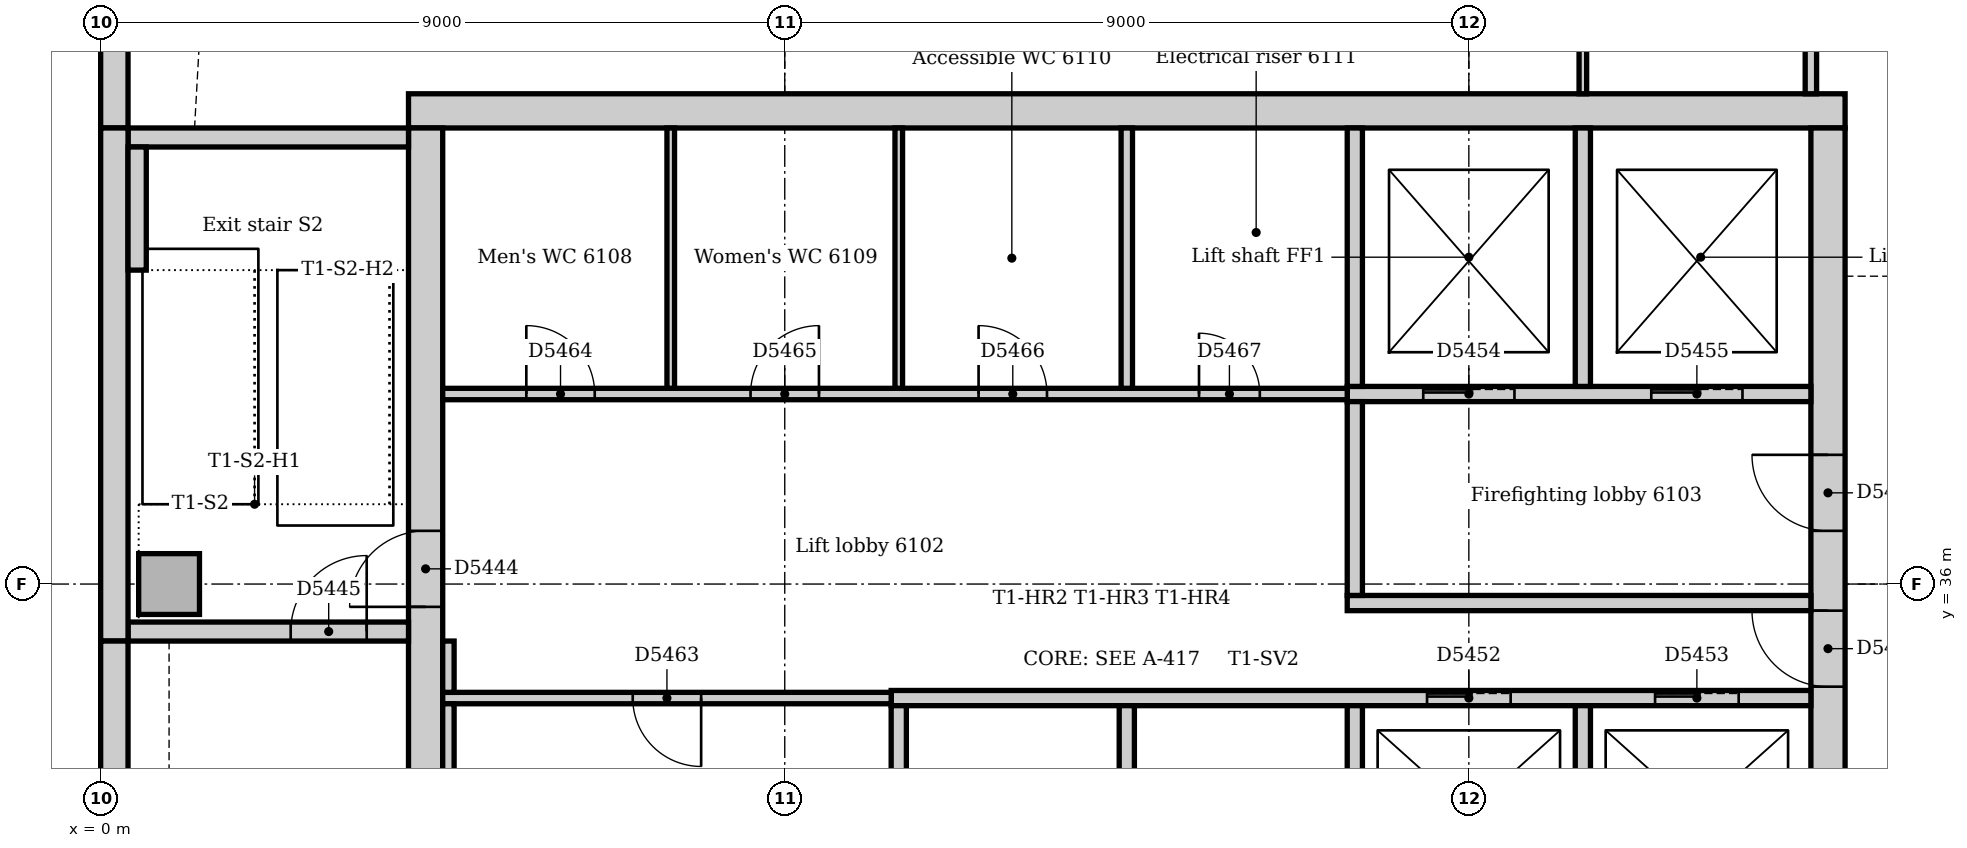
"""IFC4 building model, lengths in metres.
Left out: names, types, materials, properties, quantities, classifications, styles, units other than length and angle.
Written with IfcOpenShell. Run it as: python <this file> out.ifc"""

import sys

from ifc_helpers import new_model, si_unit, direction, frame, frame_2d, origin, origin_2d, place, context, subcontext, project, spatial, rectangle, extrude, element, fill, save


model = new_model("IFC4")
c1 = context("Model", 3, precision=1e-05, world=origin(), true_north=direction((0.0, 1.0)))
c2 = subcontext(c1, "Body", "Model", "MODEL_VIEW")
j1 = project(units=[si_unit("LENGTHUNIT", "METRE"), si_unit("PLANEANGLEUNIT", "RADIAN")], contexts=[c1])
p1 = place(None, origin())
s1 = spatial("IfcSite", under=j1, at=p1, CompositionType="ELEMENT")
p2 = place(p1, origin())
s2 = spatial("IfcBuilding", under=s1, at=p2, CompositionType="ELEMENT")
p3 = place(p2, frame((0.0, 0.0, 255.0)))
s3 = spatial("IfcBuildingStorey", under=s2, at=p3, CompositionType="ELEMENT", Elevation=255.0)
p4 = place(p3, frame((22.95, 42.225, 0.0), z_axis=(0.0, 0.0, 1.0), x_axis=(-1.0, 0.0, 0.0)))
e1 = element("IfcWall", 1, at=p4, inside=s3, PredefinedType="SOLIDWALL", context=c2, shape_type="SweptSolid", body=[
    extrude(rectangle(XDim=18.9, YDim=0.45, at=frame_2d((9.45, 0.0))), origin(), (0.0, 0.0, 1.0), 4.0),
])
p5 = place(p3, frame((22.725, 31.5, 0.0), z_axis=(0.0, 0.0, 1.0), x_axis=(0.0, 1.0, 0.0)))
e2 = element("IfcWall", 2, at=p5, inside=s3, PredefinedType="SOLIDWALL", context=c2, shape_type="SweptSolid", body=[
    extrude(rectangle(XDim=10.5, YDim=0.45, at=frame_2d((5.25, 0.0))), origin(), (0.0, 0.0, 1.0), 4.0),
])
p6 = place(p5, frame((3.15, 0.0, 0.0)))
e3 = element("IfcOpeningElement", 3, at=p6, cuts=e2, PredefinedType="OPENING", context=c2, shape_type="SweptSolid", body=[
    extrude(rectangle(XDim=1.0, YDim=2.1, at=frame_2d((0.5, 1.05))), frame((0.0, 0.235, 0.0), z_axis=(0.0, -1.0, 0.0), x_axis=(1.0, 0.0, 0.0)), (0.0, 0.0, 1.0), 0.47),
])
p7 = place(p5, frame((5.2, 0.0, 0.0)))
e4 = element("IfcOpeningElement", 4, at=p7, cuts=e2, PredefinedType="OPENING", context=c2, shape_type="SweptSolid", body=[
    extrude(rectangle(XDim=1.0, YDim=2.1, at=frame_2d((0.5, 1.05))), frame((0.0, 0.235, 0.0), z_axis=(0.0, -1.0, 0.0), x_axis=(1.0, 0.0, 0.0)), (0.0, 0.0, 1.0), 0.47),
])
p8 = place(p3, frame((4.275, 42.0, 0.0), z_axis=(0.0, 0.0, 1.0), x_axis=(0.0, -1.0, 0.0)))
e5 = element("IfcWall", 5, at=p8, inside=s3, PredefinedType="SOLIDWALL", context=c2, shape_type="SweptSolid", body=[
    extrude(rectangle(XDim=10.5, YDim=0.45, at=frame_2d((5.25, 0.0))), origin(), (0.0, 0.0, 1.0), 4.0),
])
p9 = place(p8, frame((5.3, 0.0, 0.0)))
e6 = element("IfcOpeningElement", 6, at=p9, cuts=e5, PredefinedType="OPENING", context=c2, shape_type="SweptSolid", body=[
    extrude(rectangle(XDim=1.0, YDim=2.1, at=frame_2d((0.5, 1.05))), frame((0.0, 0.235, 0.0), z_axis=(0.0, -1.0, 0.0), x_axis=(1.0, 0.0, 0.0)), (0.0, 0.0, 1.0), 0.47),
])
p10 = place(p3, frame((0.36, 35.375, 0.0), z_axis=(0.0, 0.0, 1.0), x_axis=(1.0, 0.0, 0.0)))
e7 = element("IfcWall", 7, at=p10, inside=s3, PredefinedType="SOLIDWALL", context=c2, shape_type="SweptSolid", body=[
    extrude(rectangle(XDim=3.69, YDim=0.25, at=frame_2d((1.845, 0.0))), origin(), (0.0, 0.0, 1.0), 4.0),
])
p11 = place(p10, frame((2.14, 0.0, 0.0)))
e8 = element("IfcOpeningElement", 8, at=p11, cuts=e7, PredefinedType="OPENING", context=c2, shape_type="SweptSolid", body=[
    extrude(rectangle(XDim=1.0, YDim=2.1, at=frame_2d((0.5, 1.05))), frame((0.0, 0.135, 0.0), z_axis=(0.0, -1.0, 0.0), x_axis=(1.0, 0.0, 0.0)), (0.0, 0.0, 1.0), 0.27),
])
p12 = place(p3, frame((4.05, 41.875, 0.0), z_axis=(0.0, 0.0, 1.0), x_axis=(-1.0, 0.0, 0.0)))
e9 = element("IfcWall", 9, at=p12, inside=s3, PredefinedType="SOLIDWALL", context=c2, shape_type="SweptSolid", body=[
    extrude(rectangle(XDim=3.69, YDim=0.25, at=frame_2d((1.845, 0.0))), origin(), (0.0, 0.0, 1.0), 4.0),
])
p13 = place(p3, frame((0.9, 36.0, 0.0), z_axis=(0.0, 0.0, 1.0), x_axis=(1.0, 0.0, 0.0)))
e10 = element("IfcColumn", 10, at=p13, inside=s3, PredefinedType="COLUMN", context=c2, shape_type="SweptSolid", body=[
    extrude(rectangle(XDim=0.8, YDim=0.8, at=origin_2d()), origin(), (0.0, 0.0, 1.0), 4.0),
])
p14 = place(p3, frame((0.18, 58.757, 0.0), z_axis=(0.0, 0.0, 1.0), x_axis=(0.0, -1.0, 0.0)))
e11 = element("IfcWall", 11, at=p14, inside=s3, PredefinedType="STANDARD", context=c2, shape_type="SweptSolid", body=[
    extrude(rectangle(XDim=16.757, YDim=0.36, at=frame_2d((8.379, 0.0))), origin(), (0.0, 0.0, 1.0), 3.85),
])
p15 = place(p14, frame((3.107, 0.0, 0.9)))
e12 = element("IfcOpeningElement", 12, at=p15, cuts=e11, PredefinedType="OPENING", context=c2, shape_type="SweptSolid", body=[
    extrude(rectangle(XDim=3.3, YDim=1.6, at=frame_2d((1.65, 0.8))), frame((0.0, 0.19, 0.0), z_axis=(0.0, -1.0, 0.0), x_axis=(1.0, 0.0, 0.0)), (0.0, 0.0, 1.0), 0.38),
])
p16 = place(p14, frame((7.607, 0.0, 0.9)))
e13 = element("IfcOpeningElement", 13, at=p16, cuts=e11, PredefinedType="OPENING", context=c2, shape_type="SweptSolid", body=[
    extrude(rectangle(XDim=3.3, YDim=1.6, at=frame_2d((1.65, 0.8))), frame((0.0, 0.19, 0.0), z_axis=(0.0, -1.0, 0.0), x_axis=(1.0, 0.0, 0.0)), (0.0, 0.0, 1.0), 0.38),
])
p17 = place(p14, frame((12.107, 0.0, 0.9)))
e14 = element("IfcOpeningElement", 14, at=p17, cuts=e11, PredefinedType="OPENING", context=c2, shape_type="SweptSolid", body=[
    extrude(rectangle(XDim=3.3, YDim=1.6, at=frame_2d((1.65, 0.8))), frame((0.0, 0.19, 0.0), z_axis=(0.0, -1.0, 0.0), x_axis=(1.0, 0.0, 0.0)), (0.0, 0.0, 1.0), 0.38),
])
p18 = place(p3, frame((0.18, 42.0, 0.0), z_axis=(0.0, 0.0, 1.0), x_axis=(0.0, -1.0, 0.0)))
e15 = element("IfcWall", 15, at=p18, inside=s3, PredefinedType="STANDARD", context=c2, shape_type="SweptSolid", body=[
    extrude(rectangle(XDim=6.75, YDim=0.36, at=frame_2d((3.375, 0.0))), origin(), (0.0, 0.0, 1.0), 3.85),
])
p19 = place(p3, frame((0.18, 35.25, 0.0), z_axis=(0.0, 0.0, 1.0), x_axis=(0.0, -1.0, 0.0)))
e16 = element("IfcWall", 16, at=p19, inside=s3, PredefinedType="STANDARD", context=c2, shape_type="SweptSolid", body=[
    extrude(rectangle(XDim=7.5, YDim=0.36, at=frame_2d((3.75, 0.0))), origin(), (0.0, 0.0, 1.0), 3.85),
])
p20 = place(p3, frame((0.48, 40.13, 0.0), z_axis=(0.0, 0.0, 1.0), x_axis=(0.0, 1.0, 0.0)))
e17 = element("IfcWall", 17, at=p20, inside=s3, PredefinedType="STANDARD", context=c2, shape_type="SweptSolid", body=[
    extrude(rectangle(XDim=1.62, YDim=0.24, at=frame_2d((0.81, 0.0))), origin(), (0.0, 0.0, 1.0), 4.0),
])
p21 = place(p3, frame((16.4, 35.75, 0.0), z_axis=(0.0, 0.0, 1.0), x_axis=(1.0, 0.0, 0.0)))
e18 = element("IfcWall", 18, at=p21, inside=s3, PredefinedType="PARTITIONING", context=c2, shape_type="SweptSolid", body=[
    extrude(rectangle(XDim=6.1, YDim=0.2, at=frame_2d((3.05, 0.0))), origin(), (0.0, 0.0, 1.0), 3.85),
])
p22 = place(p3, frame((16.4, 38.5, 0.0), z_axis=(0.0, 0.0, 1.0), x_axis=(1.0, 0.0, 0.0)))
e19 = element("IfcWall", 19, at=p22, inside=s3, PredefinedType="PARTITIONING", context=c2, shape_type="SweptSolid", body=[
    extrude(rectangle(XDim=6.1, YDim=0.2, at=frame_2d((3.05, 0.0))), origin(), (0.0, 0.0, 1.0), 3.85),
])
p23 = place(p22, frame((1.0, 0.0, 0.0)))
e20 = element("IfcOpeningElement", 20, at=p23, cuts=e19, PredefinedType="OPENING", context=c2, shape_type="SweptSolid", body=[
    extrude(rectangle(XDim=1.2, YDim=2.1, at=frame_2d((0.6, 1.05))), frame((0.0, 0.11, 0.0), z_axis=(0.0, -1.0, 0.0), x_axis=(1.0, 0.0, 0.0)), (0.0, 0.0, 1.0), 0.22),
])
p24 = place(p22, frame((4.0, 0.0, 0.0)))
e21 = element("IfcOpeningElement", 21, at=p24, cuts=e19, PredefinedType="OPENING", context=c2, shape_type="SweptSolid", body=[
    extrude(rectangle(XDim=1.2, YDim=2.1, at=frame_2d((0.6, 1.05))), frame((0.0, 0.11, 0.0), z_axis=(0.0, -1.0, 0.0), x_axis=(1.0, 0.0, 0.0)), (0.0, 0.0, 1.0), 0.22),
])
p25 = place(p3, frame((16.5, 35.85, 0.0), z_axis=(0.0, 0.0, 1.0), x_axis=(0.0, 1.0, 0.0)))
e22 = element("IfcWall", 22, at=p25, inside=s3, PredefinedType="PARTITIONING", context=c2, shape_type="SweptSolid", body=[
    extrude(rectangle(XDim=2.55, YDim=0.2, at=frame_2d((1.275, 0.0))), origin(), (0.0, 0.0, 1.0), 3.85),
])
p26 = place(p3, frame((10.4, 34.5, 0.0), z_axis=(0.0, 0.0, 1.0), x_axis=(1.0, 0.0, 0.0)))
e23 = element("IfcWall", 23, at=p26, inside=s3, PredefinedType="PARTITIONING", context=c2, shape_type="SweptSolid", body=[
    extrude(rectangle(XDim=12.1, YDim=0.2, at=frame_2d((6.05, 0.0))), origin(), (0.0, 0.0, 1.0), 3.85),
])
p27 = place(p26, frame((7.05, 0.0, 0.0)))
e24 = element("IfcOpeningElement", 24, at=p27, cuts=e23, PredefinedType="OPENING", context=c2, shape_type="SweptSolid", body=[
    extrude(rectangle(XDim=1.1, YDim=2.1, at=frame_2d((0.55, 1.05))), frame((0.0, 0.11, 0.0), z_axis=(0.0, -1.0, 0.0), x_axis=(1.0, 0.0, 0.0)), (0.0, 0.0, 1.0), 0.22),
])
p28 = place(p26, frame((10.05, 0.0, 0.0)))
e25 = element("IfcOpeningElement", 25, at=p28, cuts=e23, PredefinedType="OPENING", context=c2, shape_type="SweptSolid", body=[
    extrude(rectangle(XDim=1.1, YDim=2.1, at=frame_2d((0.55, 1.05))), frame((0.0, 0.11, 0.0), z_axis=(0.0, -1.0, 0.0), x_axis=(1.0, 0.0, 0.0)), (0.0, 0.0, 1.0), 0.22),
])
for number, where, z_axis, x_axis in (
    (26, (10.5, 31.75, 0.0), (0.0, 0.0, 1.0), (0.0, 1.0, 0.0)),
    (27, (13.5, 31.75, 0.0), (0.0, 0.0, 1.0), (0.0, 1.0, 0.0)),
    (28, (16.5, 31.75, 0.0), (0.0, 0.0, 1.0), (0.0, 1.0, 0.0)),
    (29, (19.5, 31.75, 0.0), (0.0, 0.0, 1.0), (0.0, 1.0, 0.0)),
):
    element("IfcWall", number, at=place(p3, frame(where, z_axis=z_axis, x_axis=x_axis)), inside=s3, PredefinedType="PARTITIONING", context=c2, shape_type="SweptSolid", body=[
        extrude(rectangle(XDim=2.65, YDim=0.2, at=frame_2d((1.325, 0.0))), origin(), (0.0, 0.0, 1.0), 3.85),
    ])
for number, where, z_axis, x_axis in (
    (30, (16.5, 38.6, 0.0), (0.0, 0.0, 1.0), (0.0, 1.0, 0.0)),
    (31, (19.5, 38.6, 0.0), (0.0, 0.0, 1.0), (0.0, 1.0, 0.0)),
):
    element("IfcWall", number, at=place(p3, frame(where, z_axis=z_axis, x_axis=x_axis)), inside=s3, PredefinedType="PARTITIONING", context=c2, shape_type="SweptSolid", body=[
        extrude(rectangle(XDim=3.4, YDim=0.2, at=frame_2d((1.7, 0.0))), origin(), (0.0, 0.0, 1.0), 3.85),
    ])
p29 = place(p3, frame((4.5, 38.5, 0.0), z_axis=(0.0, 0.0, 1.0), x_axis=(1.0, 0.0, 0.0)))
e32 = element("IfcWall", 32, at=p29, inside=s3, PredefinedType="PARTITIONING", context=c2, shape_type="SweptSolid", body=[
    extrude(rectangle(XDim=11.9, YDim=0.15, at=frame_2d((5.95, 0.0))), origin(), (0.0, 0.0, 1.0), 3.85),
])
p30 = place(p29, frame((1.1, 0.0, 0.0)))
e33 = element("IfcOpeningElement", 33, at=p30, cuts=e32, PredefinedType="OPENING", context=c2, shape_type="SweptSolid", body=[
    extrude(rectangle(XDim=0.9, YDim=2.1, at=frame_2d((0.45, 1.05))), frame((0.0, 0.085, 0.0), z_axis=(0.0, -1.0, 0.0), x_axis=(1.0, 0.0, 0.0)), (0.0, 0.0, 1.0), 0.17),
])
p31 = place(p29, frame((4.05, 0.0, 0.0)))
e34 = element("IfcOpeningElement", 34, at=p31, cuts=e32, PredefinedType="OPENING", context=c2, shape_type="SweptSolid", body=[
    extrude(rectangle(XDim=0.9, YDim=2.1, at=frame_2d((0.45, 1.05))), frame((0.0, 0.085, 0.0), z_axis=(0.0, -1.0, 0.0), x_axis=(1.0, 0.0, 0.0)), (0.0, 0.0, 1.0), 0.17),
])
p32 = place(p29, frame((7.05, 0.0, 0.0)))
e35 = element("IfcOpeningElement", 35, at=p32, cuts=e32, PredefinedType="OPENING", context=c2, shape_type="SweptSolid", body=[
    extrude(rectangle(XDim=0.9, YDim=2.1, at=frame_2d((0.45, 1.05))), frame((0.0, 0.085, 0.0), z_axis=(0.0, -1.0, 0.0), x_axis=(1.0, 0.0, 0.0)), (0.0, 0.0, 1.0), 0.17),
])
p33 = place(p29, frame((9.95, 0.0, 0.0)))
e36 = element("IfcOpeningElement", 36, at=p33, cuts=e32, PredefinedType="OPENING", context=c2, shape_type="SweptSolid", body=[
    extrude(rectangle(XDim=0.8, YDim=2.1, at=frame_2d((0.4, 1.05))), frame((0.0, 0.085, 0.0), z_axis=(0.0, -1.0, 0.0), x_axis=(1.0, 0.0, 0.0)), (0.0, 0.0, 1.0), 0.17),
])
p34 = place(p3, frame((4.5, 34.5, 0.0), z_axis=(0.0, 0.0, 1.0), x_axis=(1.0, 0.0, 0.0)))
e37 = element("IfcWall", 37, at=p34, inside=s3, PredefinedType="PARTITIONING", context=c2, shape_type="SweptSolid", body=[
    extrude(rectangle(XDim=5.9, YDim=0.15, at=frame_2d((2.95, 0.0))), origin(), (0.0, 0.0, 1.0), 3.85),
])
p35 = place(p34, frame((2.5, 0.0, 0.0)))
e38 = element("IfcOpeningElement", 38, at=p35, cuts=e37, PredefinedType="OPENING", context=c2, shape_type="SweptSolid", body=[
    extrude(rectangle(XDim=0.9, YDim=2.1, at=frame_2d((0.45, 1.05))), frame((0.0, 0.085, 0.0), z_axis=(0.0, -1.0, 0.0), x_axis=(1.0, 0.0, 0.0)), (0.0, 0.0, 1.0), 0.17),
])
p36 = place(p3, frame((4.575, 34.575, 0.0), z_axis=(0.0, 0.0, 1.0), x_axis=(0.0, 1.0, 0.0)))
e39 = element("IfcWall", 39, at=p36, inside=s3, PredefinedType="PARTITIONING", context=c2, shape_type="SweptSolid", body=[
    extrude(rectangle(XDim=0.675, YDim=0.15, at=frame_2d((0.338, 0.0))), origin(), (0.0, 0.0, 1.0), 3.85),
])
p37 = place(p3, frame((4.575, 31.75, 0.0), z_axis=(0.0, 0.0, 1.0), x_axis=(0.0, 1.0, 0.0)))
e40 = element("IfcWall", 40, at=p37, inside=s3, PredefinedType="PARTITIONING", context=c2, shape_type="SweptSolid", body=[
    extrude(rectangle(XDim=2.675, YDim=0.15, at=frame_2d((1.337, 0.0))), origin(), (0.0, 0.0, 1.0), 3.85),
])
p38 = place(p3, frame((22.5, 42.45, 0.0), z_axis=(0.0, 0.0, 1.0), x_axis=(0.0, 1.0, 0.0)))
e41 = element("IfcWall", 41, at=p38, inside=s3, PredefinedType="PARTITIONING", context=c2, shape_type="SweptSolid", body=[
    extrude(rectangle(XDim=2.475, YDim=0.15, at=frame_2d((1.238, 0.0))), origin(), (0.0, 0.0, 1.0), 3.85),
])
p39 = place(p3, frame((13.5, 38.575, 0.0), z_axis=(0.0, 0.0, 1.0), x_axis=(0.0, 1.0, 0.0)))
e42 = element("IfcWall", 42, at=p39, inside=s3, PredefinedType="PARTITIONING", context=c2, shape_type="SweptSolid", body=[
    extrude(rectangle(XDim=3.425, YDim=0.15, at=frame_2d((1.712, 0.0))), origin(), (0.0, 0.0, 1.0), 3.85),
])
p40 = place(p3, frame((19.5, 42.45, 0.0), z_axis=(0.0, 0.0, 1.0), x_axis=(0.0, 1.0, 0.0)))
e43 = element("IfcWall", 43, at=p40, inside=s3, PredefinedType="PARTITIONING", context=c2, shape_type="SweptSolid", body=[
    extrude(rectangle(XDim=20.19, YDim=0.1, at=frame_2d((10.095, 0.0))), origin(), (0.0, 0.0, 1.0), 3.85),
])
p41 = place(p40, frame((9.4, 0.0, 0.0)))
e44 = element("IfcOpeningElement", 44, at=p41, cuts=e43, PredefinedType="OPENING", context=c2, shape_type="SweptSolid", body=[
    extrude(rectangle(XDim=0.9, YDim=2.1, at=frame_2d((0.45, 1.05))), frame((0.0, 0.06, 0.0), z_axis=(0.0, -1.0, 0.0), x_axis=(1.0, 0.0, 0.0)), (0.0, 0.0, 1.0), 0.12),
])
for number, where, z_axis, x_axis in (
    (45, (7.5, 38.575, 0.0), (0.0, 0.0, 1.0), (0.0, 1.0, 0.0)),
    (46, (10.5, 38.575, 0.0), (0.0, 0.0, 1.0), (0.0, 1.0, 0.0)),
):
    element("IfcWall", number, at=place(p3, frame(where, z_axis=z_axis, x_axis=x_axis)), inside=s3, PredefinedType="PARTITIONING", context=c2, shape_type="SweptSolid", body=[
        extrude(rectangle(XDim=3.425, YDim=0.1, at=frame_2d((1.712, 0.0))), origin(), (0.0, 0.0, 1.0), 3.85),
    ])
p42 = place(p9, frame((1.0, 0.0, 0.0), z_axis=(0.0, 0.0, 1.0), x_axis=(-1.0, 0.0, 0.0)))
e47 = element("IfcDoor", 47, at=p42, inside=s3, OperationType="SINGLE_SWING_LEFT", PredefinedType="DOOR", context=c2, shape_type="SweptSolid", body=[
    extrude(rectangle(XDim=1.0, YDim=2.1, at=frame_2d((0.5, 1.05))), frame((0.0, 0.025, 0.0), z_axis=(0.0, -1.0, 0.0), x_axis=(1.0, 0.0, 0.0)), (0.0, 0.0, 1.0), 0.05),
])
fill(e6, e47)
p43 = place(p11, origin())
e48 = element("IfcDoor", 48, at=p43, inside=s3, OperationType="SINGLE_SWING_RIGHT", PredefinedType="DOOR", context=c2, shape_type="SweptSolid", body=[
    extrude(rectangle(XDim=1.0, YDim=2.1, at=frame_2d((0.5, 1.05))), frame((0.0, 0.025, 0.0), z_axis=(0.0, -1.0, 0.0), x_axis=(1.0, 0.0, 0.0)), (0.0, 0.0, 1.0), 0.05),
])
fill(e8, e48)
p44 = place(p27, origin())
e49 = element("IfcDoor", 49, at=p44, inside=s3, OperationType="SLIDING_TO_LEFT", PredefinedType="DOOR", context=c2, shape_type="SweptSolid", body=[
    extrude(rectangle(XDim=1.1, YDim=2.1, at=frame_2d((0.55, 1.05))), frame((0.0, 0.025, 0.0), z_axis=(0.0, -1.0, 0.0), x_axis=(1.0, 0.0, 0.0)), (0.0, 0.0, 1.0), 0.05),
])
fill(e24, e49)
p45 = place(p28, origin())
e50 = element("IfcDoor", 50, at=p45, inside=s3, OperationType="SLIDING_TO_LEFT", PredefinedType="DOOR", context=c2, shape_type="SweptSolid", body=[
    extrude(rectangle(XDim=1.1, YDim=2.1, at=frame_2d((0.55, 1.05))), frame((0.0, 0.025, 0.0), z_axis=(0.0, -1.0, 0.0), x_axis=(1.0, 0.0, 0.0)), (0.0, 0.0, 1.0), 0.05),
])
fill(e25, e50)
p46 = place(p23, origin())
e51 = element("IfcDoor", 51, at=p46, inside=s3, OperationType="SLIDING_TO_LEFT", PredefinedType="DOOR", context=c2, shape_type="SweptSolid", body=[
    extrude(rectangle(XDim=1.2, YDim=2.1, at=frame_2d((0.6, 1.05))), frame((0.0, 0.025, 0.0), z_axis=(0.0, -1.0, 0.0), x_axis=(1.0, 0.0, 0.0)), (0.0, 0.0, 1.0), 0.05),
])
fill(e20, e51)
p47 = place(p24, origin())
e52 = element("IfcDoor", 52, at=p47, inside=s3, OperationType="SLIDING_TO_LEFT", PredefinedType="DOOR", context=c2, shape_type="SweptSolid", body=[
    extrude(rectangle(XDim=1.2, YDim=2.1, at=frame_2d((0.6, 1.05))), frame((0.0, 0.025, 0.0), z_axis=(0.0, -1.0, 0.0), x_axis=(1.0, 0.0, 0.0)), (0.0, 0.0, 1.0), 0.05),
])
fill(e21, e52)
p48 = place(p6, origin())
e53 = element("IfcDoor", 53, at=p48, inside=s3, OperationType="SINGLE_SWING_RIGHT", PredefinedType="DOOR", context=c2, shape_type="SweptSolid", body=[
    extrude(rectangle(XDim=1.0, YDim=2.1, at=frame_2d((0.5, 1.05))), frame((0.0, 0.025, 0.0), z_axis=(0.0, -1.0, 0.0), x_axis=(1.0, 0.0, 0.0)), (0.0, 0.0, 1.0), 0.05),
])
fill(e3, e53)
p49 = place(p7, origin())
e54 = element("IfcDoor", 54, at=p49, inside=s3, OperationType="SINGLE_SWING_RIGHT", PredefinedType="DOOR", context=c2, shape_type="SweptSolid", body=[
    extrude(rectangle(XDim=1.0, YDim=2.1, at=frame_2d((0.5, 1.05))), frame((0.0, 0.025, 0.0), z_axis=(0.0, -1.0, 0.0), x_axis=(1.0, 0.0, 0.0)), (0.0, 0.0, 1.0), 0.05),
])
fill(e4, e54)
p50 = place(p35, frame((0.9, 0.0, 0.0), z_axis=(0.0, 0.0, 1.0), x_axis=(-1.0, 0.0, 0.0)))
e55 = element("IfcDoor", 55, at=p50, inside=s3, OperationType="SINGLE_SWING_LEFT", PredefinedType="DOOR", context=c2, shape_type="SweptSolid", body=[
    extrude(rectangle(XDim=0.9, YDim=2.1, at=frame_2d((0.45, 1.05))), frame((0.0, 0.025, 0.0), z_axis=(0.0, -1.0, 0.0), x_axis=(1.0, 0.0, 0.0)), (0.0, 0.0, 1.0), 0.05),
])
fill(e38, e55)
p51 = place(p30, origin())
e56 = element("IfcDoor", 56, at=p51, inside=s3, OperationType="SINGLE_SWING_LEFT", PredefinedType="DOOR", context=c2, shape_type="SweptSolid", body=[
    extrude(rectangle(XDim=0.9, YDim=2.1, at=frame_2d((0.45, 1.05))), frame((0.0, 0.025, 0.0), z_axis=(0.0, -1.0, 0.0), x_axis=(1.0, 0.0, 0.0)), (0.0, 0.0, 1.0), 0.05),
])
fill(e33, e56)
p52 = place(p31, origin())
e57 = element("IfcDoor", 57, at=p52, inside=s3, OperationType="SINGLE_SWING_RIGHT", PredefinedType="DOOR", context=c2, shape_type="SweptSolid", body=[
    extrude(rectangle(XDim=0.9, YDim=2.1, at=frame_2d((0.45, 1.05))), frame((0.0, 0.025, 0.0), z_axis=(0.0, -1.0, 0.0), x_axis=(1.0, 0.0, 0.0)), (0.0, 0.0, 1.0), 0.05),
])
fill(e34, e57)
p53 = place(p32, origin())
e58 = element("IfcDoor", 58, at=p53, inside=s3, OperationType="SINGLE_SWING_LEFT", PredefinedType="DOOR", context=c2, shape_type="SweptSolid", body=[
    extrude(rectangle(XDim=0.9, YDim=2.1, at=frame_2d((0.45, 1.05))), frame((0.0, 0.025, 0.0), z_axis=(0.0, -1.0, 0.0), x_axis=(1.0, 0.0, 0.0)), (0.0, 0.0, 1.0), 0.05),
])
fill(e35, e58)
p54 = place(p33, origin())
e59 = element("IfcDoor", 59, at=p54, inside=s3, OperationType="SINGLE_SWING_LEFT", PredefinedType="DOOR", context=c2, shape_type="SweptSolid", body=[
    extrude(rectangle(XDim=0.8, YDim=2.1, at=frame_2d((0.4, 1.05))), frame((0.0, 0.025, 0.0), z_axis=(0.0, -1.0, 0.0), x_axis=(1.0, 0.0, 0.0)), (0.0, 0.0, 1.0), 0.05),
])
fill(e36, e59)
save(model, sys.argv[1])
